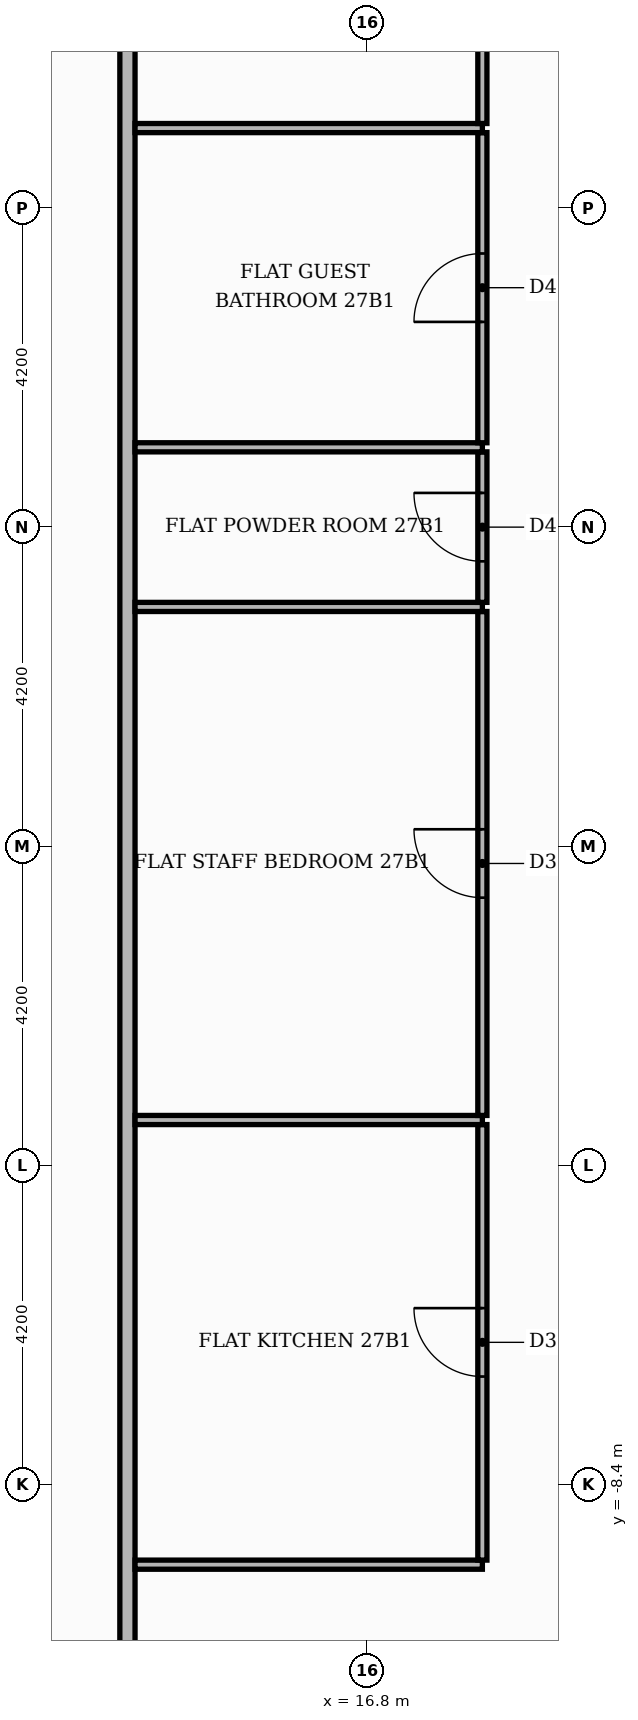
"""IFC4 building model, lengths in metres.
Left out: names, types, materials, properties, quantities, classifications, styles, units other than length and angle.
Written with IfcOpenShell. Run it as: python <this file> out.ifc"""

import sys

from ifc_helpers import new_model, si_unit, direction, frame, frame_2d, origin, place, context, subcontext, project, spatial, rectangle, extrude, element, fill, save


model = new_model("IFC4")
c1 = context("Model", 3, precision=1e-05, world=origin(), true_north=direction((0.0, 1.0)))
c2 = subcontext(c1, "Body", "Model", "MODEL_VIEW")
j1 = project(units=[si_unit("LENGTHUNIT", "METRE"), si_unit("PLANEANGLEUNIT", "RADIAN")], contexts=[c1])
p1 = place(None, origin())
s1 = spatial("IfcSite", under=j1, at=p1, CompositionType="ELEMENT")
p2 = place(p1, origin())
s2 = spatial("IfcBuilding", under=s1, at=p2, CompositionType="ELEMENT")
p3 = place(p2, frame((0.0, 0.0, 114.3)))
s3 = spatial("IfcBuildingStorey", under=s2, at=p3, CompositionType="ELEMENT", Elevation=114.3)
p4 = place(p3, frame((13.65, -13.55, 0.0), z_axis=(0.0, 0.0, 1.0), x_axis=(0.0, 1.0, 0.0)))
e1 = element("IfcWall", 1, at=p4, inside=s3, PredefinedType="PARTITIONING", context=c2, shape_type="SweptSolid", body=[
    extrude(rectangle(XDim=27.1, YDim=0.2, at=frame_2d((13.55, 0.0))), origin(), (0.0, 0.0, 1.0), 3.48),
])
p5 = place(p4, frame((1.45, 0.0, 0.0)))
e2 = element("IfcOpeningElement", 2, at=p5, cuts=e1, PredefinedType="OPENING", context=c2, shape_type="SweptSolid", body=[
    extrude(rectangle(XDim=1.1, YDim=2.4, at=frame_2d((0.55, 1.2))), frame((0.0, 0.11, 0.0), z_axis=(0.0, -1.0, 0.0), x_axis=(1.0, 0.0, 0.0)), (0.0, 0.0, 1.0), 0.22),
])
p6 = place(p3, frame((13.75, -9.45, 0.0), z_axis=(0.0, 0.0, 1.0), x_axis=(1.0, 0.0, 0.0)))
e3 = element("IfcWall", 3, at=p6, inside=s3, PredefinedType="PARTITIONING", context=c2, shape_type="SweptSolid", body=[
    extrude(rectangle(XDim=4.57, YDim=0.12, at=frame_2d((2.285, 0.0))), origin(), (0.0, 0.0, 1.0), 3.48),
])
p7 = place(p3, frame((18.32, -9.39, 0.0), z_axis=(0.0, 0.0, 1.0), x_axis=(0.0, 1.0, 0.0)))
e4 = element("IfcWall", 4, at=p7, inside=s3, PredefinedType="PARTITIONING", context=c2, shape_type="SweptSolid", body=[
    extrude(rectangle(XDim=5.73, YDim=0.12, at=frame_2d((2.865, 0.0))), origin(), (0.0, 0.0, 1.0), 3.48),
])
p8 = place(p7, frame((2.415, 0.0, 0.0)))
e5 = element("IfcOpeningElement", 5, at=p8, cuts=e4, PredefinedType="OPENING", context=c2, shape_type="SweptSolid", body=[
    extrude(rectangle(XDim=0.9, YDim=2.1, at=frame_2d((0.45, 1.05))), frame((0.0, 0.07, 0.0), z_axis=(0.0, -1.0, 0.0), x_axis=(1.0, 0.0, 0.0)), (0.0, 0.0, 1.0), 0.14),
])
p9 = place(p3, frame((13.75, -3.6, 0.0), z_axis=(0.0, 0.0, 1.0), x_axis=(1.0, 0.0, 0.0)))
e6 = element("IfcWall", 6, at=p9, inside=s3, PredefinedType="PARTITIONING", context=c2, shape_type="SweptSolid", body=[
    extrude(rectangle(XDim=4.57, YDim=0.12, at=frame_2d((2.285, 0.0))), origin(), (0.0, 0.0, 1.0), 3.48),
])
p10 = place(p3, frame((18.32, -3.54, 0.0), z_axis=(0.0, 0.0, 1.0), x_axis=(0.0, 1.0, 0.0)))
e7 = element("IfcWall", 7, at=p10, inside=s3, PredefinedType="PARTITIONING", context=c2, shape_type="SweptSolid", body=[
    extrude(rectangle(XDim=6.63, YDim=0.12, at=frame_2d((3.315, 0.0))), origin(), (0.0, 0.0, 1.0), 3.48),
])
p11 = place(p10, frame((2.865, 0.0, 0.0)))
e8 = element("IfcOpeningElement", 8, at=p11, cuts=e7, PredefinedType="OPENING", context=c2, shape_type="SweptSolid", body=[
    extrude(rectangle(XDim=0.9, YDim=2.1, at=frame_2d((0.45, 1.05))), frame((0.0, 0.07, 0.0), z_axis=(0.0, -1.0, 0.0), x_axis=(1.0, 0.0, 0.0)), (0.0, 0.0, 1.0), 0.14),
])
p12 = place(p3, frame((13.75, 3.15, 0.0), z_axis=(0.0, 0.0, 1.0), x_axis=(1.0, 0.0, 0.0)))
e9 = element("IfcWall", 9, at=p12, inside=s3, PredefinedType="PARTITIONING", context=c2, shape_type="SweptSolid", body=[
    extrude(rectangle(XDim=4.57, YDim=0.12, at=frame_2d((2.285, 0.0))), origin(), (0.0, 0.0, 1.0), 3.48),
])
p13 = place(p3, frame((18.32, 3.21, 0.0), z_axis=(0.0, 0.0, 1.0), x_axis=(0.0, 1.0, 0.0)))
e10 = element("IfcWall", 10, at=p13, inside=s3, PredefinedType="PARTITIONING", context=c2, shape_type="SweptSolid", body=[
    extrude(rectangle(XDim=1.98, YDim=0.12, at=frame_2d((0.99, 0.0))), origin(), (0.0, 0.0, 1.0), 3.48),
])
p14 = place(p13, frame((0.54, 0.0, 0.0)))
e11 = element("IfcOpeningElement", 11, at=p14, cuts=e10, PredefinedType="OPENING", context=c2, shape_type="SweptSolid", body=[
    extrude(rectangle(XDim=0.9, YDim=2.1, at=frame_2d((0.45, 1.05))), frame((0.0, 0.07, 0.0), z_axis=(0.0, -1.0, 0.0), x_axis=(1.0, 0.0, 0.0)), (0.0, 0.0, 1.0), 0.14),
])
p15 = place(p3, frame((13.75, 5.25, 0.0), z_axis=(0.0, 0.0, 1.0), x_axis=(1.0, 0.0, 0.0)))
e12 = element("IfcWall", 12, at=p15, inside=s3, PredefinedType="PARTITIONING", context=c2, shape_type="SweptSolid", body=[
    extrude(rectangle(XDim=4.57, YDim=0.12, at=frame_2d((2.285, 0.0))), origin(), (0.0, 0.0, 1.0), 3.48),
])
p16 = place(p3, frame((18.32, 5.31, 0.0), z_axis=(0.0, 0.0, 1.0), x_axis=(0.0, 1.0, 0.0)))
e13 = element("IfcWall", 13, at=p16, inside=s3, PredefinedType="PARTITIONING", context=c2, shape_type="SweptSolid", body=[
    extrude(rectangle(XDim=4.08, YDim=0.12, at=frame_2d((2.04, 0.0))), origin(), (0.0, 0.0, 1.0), 3.48),
])
p17 = place(p16, frame((1.59, 0.0, 0.0)))
e14 = element("IfcOpeningElement", 14, at=p17, cuts=e13, PredefinedType="OPENING", context=c2, shape_type="SweptSolid", body=[
    extrude(rectangle(XDim=0.9, YDim=2.1, at=frame_2d((0.45, 1.05))), frame((0.0, 0.07, 0.0), z_axis=(0.0, -1.0, 0.0), x_axis=(1.0, 0.0, 0.0)), (0.0, 0.0, 1.0), 0.14),
])
p18 = place(p3, frame((13.75, 9.45, 0.0), z_axis=(0.0, 0.0, 1.0), x_axis=(1.0, 0.0, 0.0)))
e15 = element("IfcWall", 15, at=p18, inside=s3, PredefinedType="PARTITIONING", context=c2, shape_type="SweptSolid", body=[
    extrude(rectangle(XDim=4.57, YDim=0.12, at=frame_2d((2.285, 0.0))), origin(), (0.0, 0.0, 1.0), 3.48),
])
p19 = place(p3, frame((18.32, 9.51, 0.0), z_axis=(0.0, 0.0, 1.0), x_axis=(0.0, 1.0, 0.0)))
e16 = element("IfcWall", 16, at=p19, inside=s3, PredefinedType="PARTITIONING", context=c2, shape_type="SweptSolid", body=[
    extrude(rectangle(XDim=4.04, YDim=0.12, at=frame_2d((2.02, 0.0))), origin(), (0.0, 0.0, 1.0), 3.48),
])
p20 = place(p19, frame((1.59, 0.0, 0.0)))
e17 = element("IfcOpeningElement", 17, at=p20, cuts=e16, PredefinedType="OPENING", context=c2, shape_type="SweptSolid", body=[
    extrude(rectangle(XDim=0.9, YDim=2.1, at=frame_2d((0.45, 1.05))), frame((0.0, 0.07, 0.0), z_axis=(0.0, -1.0, 0.0), x_axis=(1.0, 0.0, 0.0)), (0.0, 0.0, 1.0), 0.14),
])
p21 = place(p8, origin())
e18 = element("IfcDoor", 18, at=p21, inside=s3, OperationType="SINGLE_SWING_RIGHT", PredefinedType="DOOR", context=c2, shape_type="SweptSolid", body=[
    extrude(rectangle(XDim=0.9, YDim=2.1, at=frame_2d((0.45, 1.05))), frame((0.0, 0.025, 0.0), z_axis=(0.0, -1.0, 0.0), x_axis=(1.0, 0.0, 0.0)), (0.0, 0.0, 1.0), 0.05),
])
fill(e5, e18)
p22 = place(p11, origin())
e19 = element("IfcDoor", 19, at=p22, inside=s3, OperationType="SINGLE_SWING_RIGHT", PredefinedType="DOOR", context=c2, shape_type="SweptSolid", body=[
    extrude(rectangle(XDim=0.9, YDim=2.1, at=frame_2d((0.45, 1.05))), frame((0.0, 0.025, 0.0), z_axis=(0.0, -1.0, 0.0), x_axis=(1.0, 0.0, 0.0)), (0.0, 0.0, 1.0), 0.05),
])
fill(e8, e19)
p23 = place(p14, origin())
e20 = element("IfcDoor", 20, at=p23, inside=s3, OperationType="SINGLE_SWING_RIGHT", PredefinedType="DOOR", context=c2, shape_type="SweptSolid", body=[
    extrude(rectangle(XDim=0.9, YDim=2.1, at=frame_2d((0.45, 1.05))), frame((0.0, 0.025, 0.0), z_axis=(0.0, -1.0, 0.0), x_axis=(1.0, 0.0, 0.0)), (0.0, 0.0, 1.0), 0.05),
])
fill(e11, e20)
p24 = place(p17, origin())
e21 = element("IfcDoor", 21, at=p24, inside=s3, OperationType="SINGLE_SWING_LEFT", PredefinedType="DOOR", context=c2, shape_type="SweptSolid", body=[
    extrude(rectangle(XDim=0.9, YDim=2.1, at=frame_2d((0.45, 1.05))), frame((0.0, 0.025, 0.0), z_axis=(0.0, -1.0, 0.0), x_axis=(1.0, 0.0, 0.0)), (0.0, 0.0, 1.0), 0.05),
])
fill(e14, e21)
save(model, sys.argv[1])
